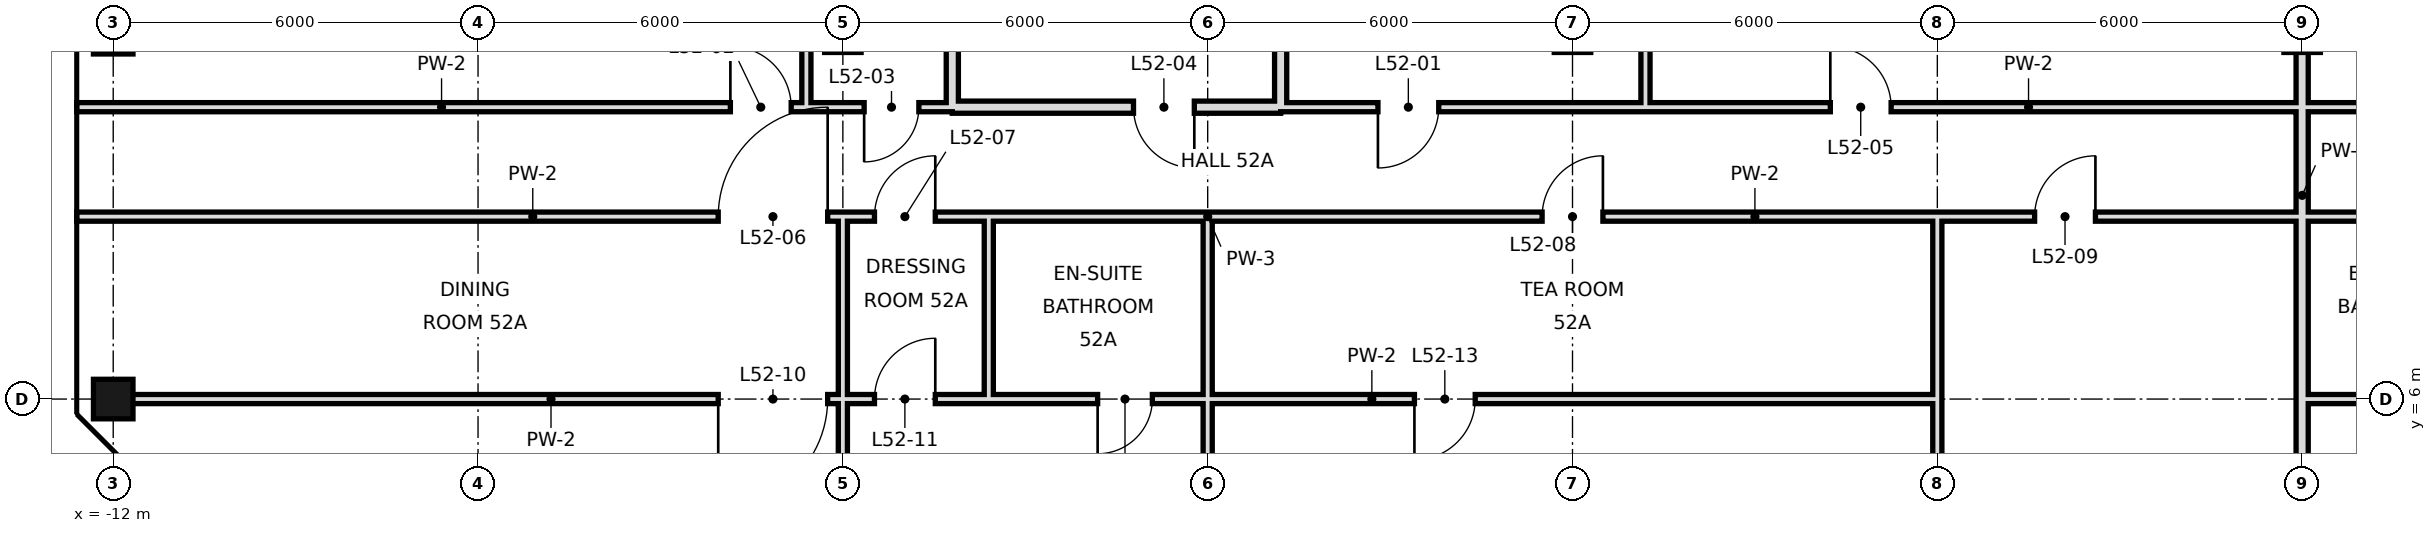
"""IFC4 building model, lengths in metres.
Left out: names, types, materials, properties, quantities, classifications, styles, units other than length and angle.
Written with IfcOpenShell. Run it as: python <this file> out.ifc"""

import sys

from ifc_helpers import new_model, si_unit, direction, frame, frame_2d, origin, origin_2d, place, context, subcontext, project, spatial, rectangle, hollow_rectangle, extrude, element, fill, save


model = new_model("IFC4")
c1 = context("Model", 3, precision=1e-05, world=origin(), true_north=direction((0.0, 1.0)))
c2 = subcontext(c1, "Body", "Model", "MODEL_VIEW")
j1 = project(units=[si_unit("LENGTHUNIT", "METRE"), si_unit("PLANEANGLEUNIT", "RADIAN")], contexts=[c1])
p1 = place(None, origin())
s1 = spatial("IfcSite", under=j1, at=p1, CompositionType="ELEMENT")
p2 = place(p1, origin())
s2 = spatial("IfcBuilding", under=s1, at=p2, CompositionType="ELEMENT")
p3 = place(p2, frame((0.0, 0.0, 222.6)))
s3 = spatial("IfcBuildingStorey", under=s2, at=p3, CompositionType="ELEMENT", Elevation=222.6)
for number, where, z_axis, x_axis in (
    (1, (-12.0, 6.0, 0.0), (0.0, 0.0, 1.0), (1.0, 0.0, 0.0)),
    (2, (-12.0, 12.0, 0.0), (0.0, 0.0, 1.0), (1.0, 0.0, 0.0)),
):
    element("IfcColumn", number, at=place(p3, frame(where, z_axis=z_axis, x_axis=x_axis)), inside=s3, PredefinedType="COLUMN", context=c2, shape_type="SweptSolid", body=[
        extrude(hollow_rectangle(XDim=0.65, YDim=0.65, WallThickness=0.032, at=origin_2d()), origin(), (0.0, 0.0, 1.0), 3.6),
    ])
p4 = place(p3, frame((-0.6, 10.8, 0.0), z_axis=(0.0, 0.0, 1.0), x_axis=(0.0, 1.0, 0.0)))
e3 = element("IfcWall", 3, at=p4, inside=s3, PredefinedType="PARTITIONING", context=c2, shape_type="SweptSolid", body=[
    extrude(rectangle(XDim=7.2, YDim=0.15, at=frame_2d((3.6, 0.0))), origin(), (0.0, 0.0, 1.0), 3.42),
])
p5 = place(p3, frame((0.0, 0.0, 0.0), z_axis=(0.0, 0.0, 1.0), x_axis=(0.0, 1.0, 0.0)))
e4 = element("IfcWall", 4, at=p5, inside=s3, PredefinedType="PARTITIONING", context=c2, shape_type="SweptSolid", body=[
    extrude(rectangle(XDim=9.0, YDim=0.15, at=frame_2d((4.5, 0.0))), origin(), (0.0, 0.0, 1.0), 2.72),
])
p6 = place(p3, frame((1.8, 10.8, 0.0), z_axis=(0.0, 0.0, 1.0), x_axis=(0.0, 1.0, 0.0)))
e5 = element("IfcWall", 5, at=p6, inside=s3, PredefinedType="SOLIDWALL", context=c2, shape_type="SweptSolid", body=[
    extrude(rectangle(XDim=7.2, YDim=0.2, at=frame_2d((3.6, 0.0))), origin(), (0.0, 0.0, 1.0), 3.42),
])
p7 = place(p3, frame((13.2, 10.8, 0.0), z_axis=(0.0, 0.0, 1.0), x_axis=(0.0, 1.0, 0.0)))
e6 = element("IfcWall", 6, at=p7, inside=s3, PredefinedType="PARTITIONING", context=c2, shape_type="SweptSolid", body=[
    extrude(rectangle(XDim=7.9, YDim=0.15, at=frame_2d((3.95, 0.0))), origin(), (0.0, 0.0, 1.0), 3.42),
])
p8 = place(p3, frame((18.0, -0.6, 0.0), z_axis=(0.0, 0.0, 1.0), x_axis=(0.0, 1.0, 0.0)))
e7 = element("IfcWall", 7, at=p8, inside=s3, PredefinedType="PARTITIONING", context=c2, shape_type="SweptSolid", body=[
    extrude(rectangle(XDim=9.6, YDim=0.15, at=frame_2d((4.8, 0.0))), origin(), (0.0, 0.0, 1.0), 2.72),
])
p9 = place(p3, frame((2.4, 6.0, 0.0), z_axis=(0.0, 0.0, 1.0), x_axis=(0.0, 1.0, 0.0)))
e8 = element("IfcWall", 8, at=p9, inside=s3, PredefinedType="PARTITIONING", context=c2, shape_type="SweptSolid", body=[
    extrude(rectangle(XDim=3.0, YDim=0.15, at=frame_2d((1.5, 0.0))), origin(), (0.0, 0.0, 1.0), 3.42),
])
p10 = place(p3, frame((24.0, 0.0, 0.0), z_axis=(0.0, 0.0, 1.0), x_axis=(0.0, 1.0, 0.0)))
e9 = element("IfcWall", 9, at=p10, inside=s3, PredefinedType="SOLIDWALL", context=c2, shape_type="SweptSolid", body=[
    extrude(rectangle(XDim=18.7, YDim=0.2, at=frame_2d((9.35, 0.0))), origin(), (0.0, 0.0, 1.0), 2.72),
])
p11 = place(p3, frame((6.0, -0.6, 0.0), z_axis=(0.0, 0.0, 1.0), x_axis=(0.0, 1.0, 0.0)))
e10 = element("IfcWall", 10, at=p11, inside=s3, PredefinedType="PARTITIONING", context=c2, shape_type="SweptSolid", body=[
    extrude(rectangle(XDim=6.6, YDim=0.15, at=frame_2d((3.3, 0.0))), origin(), (0.0, 0.0, 1.0), 2.72),
])
p12 = place(p3, frame((6.0, 6.0, 0.0), z_axis=(0.0, 0.0, 1.0), x_axis=(0.0, 1.0, 0.0)))
e11 = element("IfcWall", 11, at=p12, inside=s3, PredefinedType="PARTITIONING", context=c2, shape_type="SweptSolid", body=[
    extrude(rectangle(XDim=3.0, YDim=0.15, at=frame_2d((1.5, 0.0))), origin(), (0.0, 0.0, 1.0), 2.72),
])
p13 = place(p3, frame((7.2, 10.8, 0.0), z_axis=(0.0, 0.0, 1.0), x_axis=(0.0, 1.0, 0.0)))
e12 = element("IfcWall", 12, at=p13, inside=s3, PredefinedType="SOLIDWALL", context=c2, shape_type="SweptSolid", body=[
    extrude(rectangle(XDim=7.9, YDim=0.2, at=frame_2d((3.95, 0.0))), origin(), (0.0, 0.0, 1.0), 2.72),
])
p14 = place(p3, frame((1.8, 10.8, 0.0), z_axis=(0.0, 0.0, 1.0), x_axis=(1.0, 0.0, 0.0)))
e13 = element("IfcWall", 13, at=p14, inside=s3, PredefinedType="SOLIDWALL", context=c2, shape_type="SweptSolid", body=[
    extrude(rectangle(XDim=5.4, YDim=0.2, at=frame_2d((2.7, 0.0))), origin(), (0.0, 0.0, 1.0), 2.72),
])
p15 = place(p14, frame((2.98, 0.0, 0.0)))
e14 = element("IfcOpeningElement", 14, at=p15, cuts=e13, PredefinedType="OPENING", context=c2, shape_type="SweptSolid", body=[
    extrude(rectangle(XDim=1.0, YDim=2.4, at=frame_2d((0.5, 1.2))), frame((0.0, 0.11, 0.0), z_axis=(0.0, -1.0, 0.0), x_axis=(1.0, 0.0, 0.0)), (0.0, 0.0, 1.0), 0.22),
])
p16 = place(p3, frame((-12.6, 10.8, 0.0), z_axis=(0.0, 0.0, 1.0), x_axis=(1.0, 0.0, 0.0)))
e15 = element("IfcWall", 15, at=p16, inside=s3, PredefinedType="PARTITIONING", context=c2, shape_type="SweptSolid", body=[
    extrude(rectangle(XDim=12.0, YDim=0.15, at=frame_2d((6.0, 0.0))), origin(), (0.0, 0.0, 1.0), 3.42),
])
p17 = place(p16, frame((10.75, 0.0, 0.0)))
e16 = element("IfcOpeningElement", 16, at=p17, cuts=e15, PredefinedType="OPENING", context=c2, shape_type="SweptSolid", body=[
    extrude(rectangle(XDim=1.0, YDim=2.4, at=frame_2d((0.5, 1.2))), frame((0.0, 0.085, 0.0), z_axis=(0.0, -1.0, 0.0), x_axis=(1.0, 0.0, 0.0)), (0.0, 0.0, 1.0), 0.17),
])
p18 = place(p3, frame((7.2, 10.8, 0.0), z_axis=(0.0, 0.0, 1.0), x_axis=(1.0, 0.0, 0.0)))
e17 = element("IfcWall", 17, at=p18, inside=s3, PredefinedType="PARTITIONING", context=c2, shape_type="SweptSolid", body=[
    extrude(rectangle(XDim=24.6, YDim=0.15, at=frame_2d((12.3, 0.0))), origin(), (0.0, 0.0, 1.0), 3.42),
])
p19 = place(p18, frame((1.6, 0.0, 0.0)))
e18 = element("IfcOpeningElement", 18, at=p19, cuts=e17, PredefinedType="OPENING", context=c2, shape_type="SweptSolid", body=[
    extrude(rectangle(XDim=1.0, YDim=2.4, at=frame_2d((0.5, 1.2))), frame((0.0, 0.085, 0.0), z_axis=(0.0, -1.0, 0.0), x_axis=(1.0, 0.0, 0.0)), (0.0, 0.0, 1.0), 0.17),
])
p20 = place(p18, frame((9.04, 0.0, 0.0)))
e19 = element("IfcOpeningElement", 19, at=p20, cuts=e17, PredefinedType="OPENING", context=c2, shape_type="SweptSolid", body=[
    extrude(rectangle(XDim=1.0, YDim=2.4, at=frame_2d((0.5, 1.2))), frame((0.0, 0.085, 0.0), z_axis=(0.0, -1.0, 0.0), x_axis=(1.0, 0.0, 0.0)), (0.0, 0.0, 1.0), 0.17),
])
p21 = place(p18, frame((21.46, 0.0, 0.0)))
e20 = element("IfcOpeningElement", 20, at=p21, cuts=e17, PredefinedType="OPENING", context=c2, shape_type="SweptSolid", body=[
    extrude(rectangle(XDim=1.0, YDim=2.4, at=frame_2d((0.5, 1.2))), frame((0.0, 0.085, 0.0), z_axis=(0.0, -1.0, 0.0), x_axis=(1.0, 0.0, 0.0)), (0.0, 0.0, 1.0), 0.17),
])
p22 = place(p3, frame((-0.6, 10.8, 0.0), z_axis=(0.0, 0.0, 1.0), x_axis=(1.0, 0.0, 0.0)))
e21 = element("IfcWall", 21, at=p22, inside=s3, PredefinedType="PARTITIONING", context=c2, shape_type="SweptSolid", body=[
    extrude(rectangle(XDim=2.4, YDim=0.15, at=frame_2d((1.2, 0.0))), origin(), (0.0, 0.0, 1.0), 3.42),
])
p23 = place(p22, frame((0.95, 0.0, 0.0)))
e22 = element("IfcOpeningElement", 22, at=p23, cuts=e21, PredefinedType="OPENING", context=c2, shape_type="SweptSolid", body=[
    extrude(rectangle(XDim=0.9, YDim=2.4, at=frame_2d((0.45, 1.2))), frame((0.0, 0.085, 0.0), z_axis=(0.0, -1.0, 0.0), x_axis=(1.0, 0.0, 0.0)), (0.0, 0.0, 1.0), 0.17),
])
p24 = place(p3, frame((-12.0, 6.0, 0.0), z_axis=(0.0, 0.0, 1.0), x_axis=(1.0, 0.0, 0.0)))
e23 = element("IfcWall", 23, at=p24, inside=s3, PredefinedType="PARTITIONING", context=c2, shape_type="SweptSolid", body=[
    extrude(rectangle(XDim=14.4, YDim=0.15, at=frame_2d((7.2, 0.0))), origin(), (0.0, 0.0, 1.0), 2.72),
])
p25 = place(p24, frame((9.95, 0.0, 0.0)))
e24 = element("IfcOpeningElement", 24, at=p25, cuts=e23, PredefinedType="OPENING", context=c2, shape_type="SweptSolid", body=[
    extrude(rectangle(XDim=1.8, YDim=2.4, at=frame_2d((0.9, 1.2))), frame((0.0, 0.085, 0.0), z_axis=(0.0, -1.0, 0.0), x_axis=(1.0, 0.0, 0.0)), (0.0, 0.0, 1.0), 0.17),
])
p26 = place(p24, frame((12.52, 0.0, 0.0)))
e25 = element("IfcOpeningElement", 25, at=p26, cuts=e23, PredefinedType="OPENING", context=c2, shape_type="SweptSolid", body=[
    extrude(rectangle(XDim=1.0, YDim=2.4, at=frame_2d((0.5, 1.2))), frame((0.0, 0.085, 0.0), z_axis=(0.0, -1.0, 0.0), x_axis=(1.0, 0.0, 0.0)), (0.0, 0.0, 1.0), 0.17),
])
p27 = place(p3, frame((6.0, 6.0, 0.0), z_axis=(0.0, 0.0, 1.0), x_axis=(1.0, 0.0, 0.0)))
e26 = element("IfcWall", 26, at=p27, inside=s3, PredefinedType="PARTITIONING", context=c2, shape_type="SweptSolid", body=[
    extrude(rectangle(XDim=12.0, YDim=0.15, at=frame_2d((6.0, 0.0))), origin(), (0.0, 0.0, 1.0), 2.97),
])
p28 = place(p27, frame((3.4, 0.0, 0.0)))
e27 = element("IfcOpeningElement", 27, at=p28, cuts=e26, PredefinedType="OPENING", context=c2, shape_type="SweptSolid", body=[
    extrude(rectangle(XDim=1.0, YDim=2.4, at=frame_2d((0.5, 1.2))), frame((0.0, 0.085, 0.0), z_axis=(0.0, -1.0, 0.0), x_axis=(1.0, 0.0, 0.0)), (0.0, 0.0, 1.0), 0.17),
])
p29 = place(p3, frame((2.4, 6.0, 0.0), z_axis=(0.0, 0.0, 1.0), x_axis=(1.0, 0.0, 0.0)))
e28 = element("IfcWall", 28, at=p29, inside=s3, PredefinedType="PARTITIONING", context=c2, shape_type="SweptSolid", body=[
    extrude(rectangle(XDim=3.6, YDim=0.15, at=frame_2d((1.8, 0.0))), origin(), (0.0, 0.0, 1.0), 2.97),
])
p30 = place(p29, frame((1.79, 0.0, 0.0)))
e29 = element("IfcOpeningElement", 29, at=p30, cuts=e28, PredefinedType="OPENING", context=c2, shape_type="SweptSolid", body=[
    extrude(rectangle(XDim=0.9, YDim=2.4, at=frame_2d((0.45, 1.2))), frame((0.0, 0.085, 0.0), z_axis=(0.0, -1.0, 0.0), x_axis=(1.0, 0.0, 0.0)), (0.0, 0.0, 1.0), 0.17),
])
p31 = place(p3, frame((24.0, 6.0, 0.0), z_axis=(0.0, 0.0, 1.0), x_axis=(1.0, 0.0, 0.0)))
e30 = element("IfcWall", 30, at=p31, inside=s3, PredefinedType="PARTITIONING", context=c2, shape_type="SweptSolid", body=[
    extrude(rectangle(XDim=3.0, YDim=0.15, at=frame_2d((1.5, 0.0))), origin(), (0.0, 0.0, 1.0), 2.97),
])
p32 = place(p31, frame((1.85, 0.0, 0.0)))
e31 = element("IfcOpeningElement", 31, at=p32, cuts=e30, PredefinedType="OPENING", context=c2, shape_type="SweptSolid", body=[
    extrude(rectangle(XDim=0.9, YDim=2.4, at=frame_2d((0.45, 1.2))), frame((0.0, 0.085, 0.0), z_axis=(0.0, -1.0, 0.0), x_axis=(1.0, 0.0, 0.0)), (0.0, 0.0, 1.0), 0.17),
])
p33 = place(p3, frame((-12.6, 9.0, 0.0), z_axis=(0.0, 0.0, 1.0), x_axis=(1.0, 0.0, 0.0)))
e32 = element("IfcWall", 32, at=p33, inside=s3, PredefinedType="PARTITIONING", context=c2, shape_type="SweptSolid", body=[
    extrude(rectangle(XDim=15.0, YDim=0.15, at=frame_2d((7.5, 0.0))), origin(), (0.0, 0.0, 1.0), 3.42),
])
p34 = place(p33, frame((10.55, 0.0, 0.0)))
e33 = element("IfcOpeningElement", 33, at=p34, cuts=e32, PredefinedType="OPENING", context=c2, shape_type="SweptSolid", body=[
    extrude(rectangle(XDim=1.8, YDim=2.4, at=frame_2d((0.9, 1.2))), frame((0.0, 0.085, 0.0), z_axis=(0.0, -1.0, 0.0), x_axis=(1.0, 0.0, 0.0)), (0.0, 0.0, 1.0), 0.17),
])
p35 = place(p33, frame((13.12, 0.0, 0.0)))
e34 = element("IfcOpeningElement", 34, at=p35, cuts=e32, PredefinedType="OPENING", context=c2, shape_type="SweptSolid", body=[
    extrude(rectangle(XDim=1.0, YDim=2.4, at=frame_2d((0.5, 1.2))), frame((0.0, 0.085, 0.0), z_axis=(0.0, -1.0, 0.0), x_axis=(1.0, 0.0, 0.0)), (0.0, 0.0, 1.0), 0.17),
])
p36 = place(p3, frame((6.0, 9.0, 0.0), z_axis=(0.0, 0.0, 1.0), x_axis=(1.0, 0.0, 0.0)))
e35 = element("IfcWall", 35, at=p36, inside=s3, PredefinedType="PARTITIONING", context=c2, shape_type="SweptSolid", body=[
    extrude(rectangle(XDim=18.0, YDim=0.15, at=frame_2d((9.0, 0.0))), origin(), (0.0, 0.0, 1.0), 3.42),
])
p37 = place(p36, frame((5.5, 0.0, 0.0)))
e36 = element("IfcOpeningElement", 36, at=p37, cuts=e35, PredefinedType="OPENING", context=c2, shape_type="SweptSolid", body=[
    extrude(rectangle(XDim=1.0, YDim=2.4, at=frame_2d((0.5, 1.2))), frame((0.0, 0.085, 0.0), z_axis=(0.0, -1.0, 0.0), x_axis=(1.0, 0.0, 0.0)), (0.0, 0.0, 1.0), 0.17),
])
p38 = place(p36, frame((13.6, 0.0, 0.0)))
e37 = element("IfcOpeningElement", 37, at=p38, cuts=e35, PredefinedType="OPENING", context=c2, shape_type="SweptSolid", body=[
    extrude(rectangle(XDim=1.0, YDim=2.4, at=frame_2d((0.5, 1.2))), frame((0.0, 0.085, 0.0), z_axis=(0.0, -1.0, 0.0), x_axis=(1.0, 0.0, 0.0)), (0.0, 0.0, 1.0), 0.17),
])
p39 = place(p3, frame((2.4, 9.0, 0.0), z_axis=(0.0, 0.0, 1.0), x_axis=(1.0, 0.0, 0.0)))
e38 = element("IfcWall", 38, at=p39, inside=s3, PredefinedType="PARTITIONING", context=c2, shape_type="SweptSolid", body=[
    extrude(rectangle(XDim=3.6, YDim=0.15, at=frame_2d((1.8, 0.0))), origin(), (0.0, 0.0, 1.0), 3.42),
])
p40 = place(p3, frame((24.0, 9.0, 0.0), z_axis=(0.0, 0.0, 1.0), x_axis=(1.0, 0.0, 0.0)))
e39 = element("IfcWall", 39, at=p40, inside=s3, PredefinedType="PARTITIONING", context=c2, shape_type="SweptSolid", body=[
    extrude(rectangle(XDim=3.0, YDim=0.15, at=frame_2d((1.5, 0.0))), origin(), (0.0, 0.0, 1.0), 3.42),
])
p41 = place(p19, frame((1.0, 0.0, 0.0), z_axis=(0.0, 0.0, 1.0), x_axis=(-1.0, 0.0, 0.0)))
e40 = element("IfcDoor", 40, at=p41, inside=s3, OperationType="SINGLE_SWING_RIGHT", PredefinedType="DOOR", context=c2, shape_type="SweptSolid", body=[
    extrude(rectangle(XDim=1.0, YDim=2.4, at=frame_2d((0.5, 1.2))), frame((0.0, 0.025, 0.0), z_axis=(0.0, -1.0, 0.0), x_axis=(1.0, 0.0, 0.0)), (0.0, 0.0, 1.0), 0.05),
])
fill(e18, e40)
p42 = place(p17, origin())
e41 = element("IfcDoor", 41, at=p42, inside=s3, OperationType="SINGLE_SWING_LEFT", PredefinedType="DOOR", context=c2, shape_type="SweptSolid", body=[
    extrude(rectangle(XDim=1.0, YDim=2.4, at=frame_2d((0.5, 1.2))), frame((0.0, 0.025, 0.0), z_axis=(0.0, -1.0, 0.0), x_axis=(1.0, 0.0, 0.0)), (0.0, 0.0, 1.0), 0.05),
])
fill(e16, e41)
p43 = place(p23, frame((0.9, 0.0, 0.0), z_axis=(0.0, 0.0, 1.0), x_axis=(-1.0, 0.0, 0.0)))
e42 = element("IfcDoor", 42, at=p43, inside=s3, OperationType="SINGLE_SWING_RIGHT", PredefinedType="DOOR", context=c2, shape_type="SweptSolid", body=[
    extrude(rectangle(XDim=0.9, YDim=2.4, at=frame_2d((0.45, 1.2))), frame((0.0, 0.025, 0.0), z_axis=(0.0, -1.0, 0.0), x_axis=(1.0, 0.0, 0.0)), (0.0, 0.0, 1.0), 0.05),
])
fill(e22, e42)
p44 = place(p15, origin())
e43 = element("IfcDoor", 43, at=p44, inside=s3, OperationType="SINGLE_SWING_RIGHT", PredefinedType="DOOR", context=c2, shape_type="SweptSolid", body=[
    extrude(rectangle(XDim=1.0, YDim=2.4, at=frame_2d((0.5, 1.2))), frame((0.0, 0.025, 0.0), z_axis=(0.0, -1.0, 0.0), x_axis=(1.0, 0.0, 0.0)), (0.0, 0.0, 1.0), 0.05),
])
fill(e14, e43)
p45 = place(p20, origin())
e44 = element("IfcDoor", 44, at=p45, inside=s3, OperationType="SINGLE_SWING_LEFT", PredefinedType="DOOR", context=c2, shape_type="SweptSolid", body=[
    extrude(rectangle(XDim=1.0, YDim=2.4, at=frame_2d((0.5, 1.2))), frame((0.0, 0.025, 0.0), z_axis=(0.0, -1.0, 0.0), x_axis=(1.0, 0.0, 0.0)), (0.0, 0.0, 1.0), 0.05),
])
fill(e19, e44)
p46 = place(p34, frame((1.8, 0.0, 0.0), z_axis=(0.0, 0.0, 1.0), x_axis=(-1.0, 0.0, 0.0)))
e45 = element("IfcDoor", 45, at=p46, inside=s3, OperationType="SINGLE_SWING_LEFT", PredefinedType="DOOR", context=c2, shape_type="SweptSolid", body=[
    extrude(rectangle(XDim=1.8, YDim=2.4, at=frame_2d((0.9, 1.2))), frame((0.0, 0.025, 0.0), z_axis=(0.0, -1.0, 0.0), x_axis=(1.0, 0.0, 0.0)), (0.0, 0.0, 1.0), 0.05),
])
fill(e33, e45)
p47 = place(p35, frame((1.0, 0.0, 0.0), z_axis=(0.0, 0.0, 1.0), x_axis=(-1.0, 0.0, 0.0)))
e46 = element("IfcDoor", 46, at=p47, inside=s3, OperationType="SINGLE_SWING_LEFT", PredefinedType="DOOR", context=c2, shape_type="SweptSolid", body=[
    extrude(rectangle(XDim=1.0, YDim=2.4, at=frame_2d((0.5, 1.2))), frame((0.0, 0.025, 0.0), z_axis=(0.0, -1.0, 0.0), x_axis=(1.0, 0.0, 0.0)), (0.0, 0.0, 1.0), 0.05),
])
fill(e34, e46)
p48 = place(p37, frame((1.0, 0.0, 0.0), z_axis=(0.0, 0.0, 1.0), x_axis=(-1.0, 0.0, 0.0)))
e47 = element("IfcDoor", 47, at=p48, inside=s3, OperationType="SINGLE_SWING_LEFT", PredefinedType="DOOR", context=c2, shape_type="SweptSolid", body=[
    extrude(rectangle(XDim=1.0, YDim=2.4, at=frame_2d((0.5, 1.2))), frame((0.0, 0.025, 0.0), z_axis=(0.0, -1.0, 0.0), x_axis=(1.0, 0.0, 0.0)), (0.0, 0.0, 1.0), 0.05),
])
fill(e36, e47)
p49 = place(p38, frame((1.0, 0.0, 0.0), z_axis=(0.0, 0.0, 1.0), x_axis=(-1.0, 0.0, 0.0)))
e48 = element("IfcDoor", 48, at=p49, inside=s3, OperationType="SINGLE_SWING_LEFT", PredefinedType="DOOR", context=c2, shape_type="SweptSolid", body=[
    extrude(rectangle(XDim=1.0, YDim=2.4, at=frame_2d((0.5, 1.2))), frame((0.0, 0.025, 0.0), z_axis=(0.0, -1.0, 0.0), x_axis=(1.0, 0.0, 0.0)), (0.0, 0.0, 1.0), 0.05),
])
fill(e37, e48)
p50 = place(p25, frame((1.8, 0.0, 0.0), z_axis=(0.0, 0.0, 1.0), x_axis=(-1.0, 0.0, 0.0)))
e49 = element("IfcDoor", 49, at=p50, inside=s3, OperationType="SINGLE_SWING_RIGHT", PredefinedType="DOOR", context=c2, shape_type="SweptSolid", body=[
    extrude(rectangle(XDim=1.8, YDim=2.4, at=frame_2d((0.9, 1.2))), frame((0.0, 0.025, 0.0), z_axis=(0.0, -1.0, 0.0), x_axis=(1.0, 0.0, 0.0)), (0.0, 0.0, 1.0), 0.05),
])
fill(e24, e49)
p51 = place(p26, frame((1.0, 0.0, 0.0), z_axis=(0.0, 0.0, 1.0), x_axis=(-1.0, 0.0, 0.0)))
e50 = element("IfcDoor", 50, at=p51, inside=s3, OperationType="SINGLE_SWING_LEFT", PredefinedType="DOOR", context=c2, shape_type="SweptSolid", body=[
    extrude(rectangle(XDim=1.0, YDim=2.4, at=frame_2d((0.5, 1.2))), frame((0.0, 0.025, 0.0), z_axis=(0.0, -1.0, 0.0), x_axis=(1.0, 0.0, 0.0)), (0.0, 0.0, 1.0), 0.05),
])
fill(e25, e50)
p52 = place(p30, frame((0.9, 0.0, 0.0), z_axis=(0.0, 0.0, 1.0), x_axis=(-1.0, 0.0, 0.0)))
e51 = element("IfcDoor", 51, at=p52, inside=s3, OperationType="SINGLE_SWING_RIGHT", PredefinedType="DOOR", context=c2, shape_type="SweptSolid", body=[
    extrude(rectangle(XDim=0.9, YDim=2.4, at=frame_2d((0.45, 1.2))), frame((0.0, 0.025, 0.0), z_axis=(0.0, -1.0, 0.0), x_axis=(1.0, 0.0, 0.0)), (0.0, 0.0, 1.0), 0.05),
])
fill(e29, e51)
p53 = place(p28, frame((1.0, 0.0, 0.0), z_axis=(0.0, 0.0, 1.0), x_axis=(-1.0, 0.0, 0.0)))
e52 = element("IfcDoor", 52, at=p53, inside=s3, OperationType="SINGLE_SWING_RIGHT", PredefinedType="DOOR", context=c2, shape_type="SweptSolid", body=[
    extrude(rectangle(XDim=1.0, YDim=2.4, at=frame_2d((0.5, 1.2))), frame((0.0, 0.025, 0.0), z_axis=(0.0, -1.0, 0.0), x_axis=(1.0, 0.0, 0.0)), (0.0, 0.0, 1.0), 0.05),
])
fill(e27, e52)
save(model, sys.argv[1])
